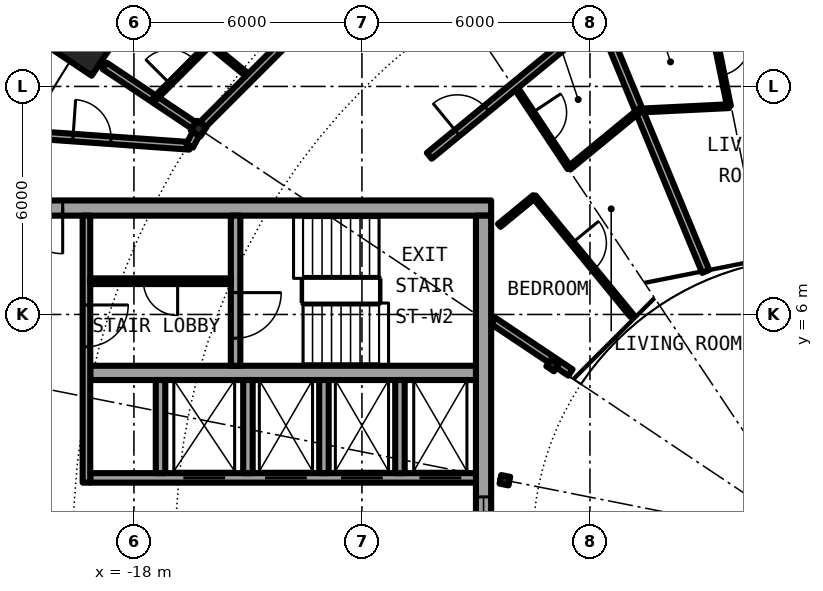
"""IFC4 building model, lengths in metres.
Left out: names, types, materials, properties, quantities, classifications, styles, units other than length and angle.
Written with IfcOpenShell. Run it as: python <this file> out.ifc"""

import sys

from ifc_helpers import new_model, si_unit, direction, frame, frame_2d, origin, origin_2d, place, context, subcontext, project, spatial, rectangle, hollow_circle, i_section, extrude, element, fill, save


model = new_model("IFC4")
c1 = context("Model", 3, precision=1e-05, world=origin(), true_north=direction((0.0, 1.0)))
c2 = subcontext(c1, "Body", "Model", "MODEL_VIEW")
j1 = project(units=[si_unit("LENGTHUNIT", "METRE"), si_unit("PLANEANGLEUNIT", "RADIAN")], contexts=[c1])
p1 = place(None, origin())
s1 = spatial("IfcSite", under=j1, at=p1, CompositionType="ELEMENT")
p2 = place(p1, origin())
s2 = spatial("IfcBuilding", under=s1, at=p2, CompositionType="ELEMENT")
p3 = place(p2, frame((0.0, 0.0, 246.25)))
s3 = spatial("IfcBuildingStorey", under=s2, at=p3, CompositionType="ELEMENT", Elevation=246.25)
p4 = place(p3, frame((-19.955, 13.334, 0.0), z_axis=(0.346819263352, -0.231767499499, 0.908845545043), x_axis=(0.555620411262, 0.831436082083, 0.0)))
e1 = element("IfcColumn", 1, at=p4, inside=s3, PredefinedType="COLUMN", context=c2, shape_type="SweptSolid", body=[
    extrude(hollow_circle(Radius=0.406, WallThickness=0.03, at=origin_2d()), origin(), (0.0, 0.0, 1.0), 3.081),
])
p5 = place(p3, frame((-16.297, 10.889, 0.0), z_axis=(0.0, 0.0, 1.0), x_axis=(-0.831469612303, 0.55557023302, 0.0)))
e2 = element("IfcColumn", 2, at=p5, inside=s3, PredefinedType="COLUMN", context=c2, shape_type="SweptSolid", body=[
    extrude(i_section(OverallWidth=0.3, OverallDepth=0.3, WebThickness=0.011, FlangeThickness=0.019, FilletRadius=0.027, at=origin_2d()), origin(), (0.0, 0.0, 1.0), 3.05),
])
for number, where, z_axis, x_axis in (
    (3, (-6.984, 4.667, 0.0), (0.0, 0.0, 1.0), (-0.831, 0.556, 0.0)),
    (4, (-8.239, 1.639, 0.0), (0.0, 0.0, 1.0), (-0.981, 0.195, 0.0)),
):
    element("IfcColumn", number, at=place(p3, frame(where, z_axis=z_axis, x_axis=x_axis)), inside=s3, PredefinedType="COLUMN", context=c2, shape_type="SweptSolid", body=[
        extrude(i_section(OverallWidth=0.24, OverallDepth=0.23, WebThickness=0.008, FlangeThickness=0.012, FilletRadius=0.021, at=origin_2d()), origin(), (0.0, 0.0, 1.0), 3.05),
    ])
p6 = place(p3, frame((-8.6, 8.8, 0.0), z_axis=(0.0, 0.0, 1.0), x_axis=(-1.0, 0.0, 0.0)))
e5 = element("IfcWall", 5, at=p6, inside=s3, PredefinedType="SHEAR", context=c2, shape_type="SweptSolid", body=[
    extrude(rectangle(XDim=13.4, YDim=0.4, at=frame_2d((6.7, 0.0))), origin(), (0.0, 0.0, 1.0), 3.05),
])
p7 = place(p6, frame((11.275, 0.0, 0.0)))
e6 = element("IfcOpeningElement", 6, at=p7, cuts=e5, PredefinedType="OPENING", context=c2, shape_type="SweptSolid", body=[
    extrude(rectangle(XDim=1.2, YDim=2.3, at=frame_2d((0.6, 1.15))), frame((0.0, 0.21, 0.0), z_axis=(0.0, -1.0, 0.0), x_axis=(1.0, 0.0, 0.0)), (0.0, 0.0, 1.0), 0.42),
])
p8 = place(p3, frame((-8.8, 8.6, 0.0), z_axis=(0.0, 0.0, 1.0), x_axis=(0.0, -1.0, 0.0)))
e7 = element("IfcWall", 7, at=p8, inside=s3, PredefinedType="SHEAR", context=c2, shape_type="SweptSolid", body=[
    extrude(rectangle(XDim=17.2, YDim=0.4, at=frame_2d((8.6, 0.0))), origin(), (0.0, 0.0, 1.0), 3.05),
])
p9 = place(p8, frame((7.4, 0.0, 0.1)))
e8 = element("IfcOpeningElement", 8, at=p9, cuts=e7, PredefinedType="OPENING", context=c2, shape_type="SweptSolid", body=[
    extrude(rectangle(XDim=2.4, YDim=2.2, at=frame_2d((1.2, 1.1))), frame((0.0, 0.21, 0.0), z_axis=(0.0, -1.0, 0.0), x_axis=(1.0, 0.0, 0.0)), (0.0, 0.0, 1.0), 0.42),
])
p10 = place(p3, frame((-9.0, 1.7, 0.0), z_axis=(0.0, 0.0, 1.0), x_axis=(-1.0, 0.0, 0.0)))
e9 = element("IfcWall", 9, at=p10, inside=s3, PredefinedType="SHEAR", context=c2, shape_type="SweptSolid", body=[
    extrude(rectangle(XDim=10.15, YDim=0.25, at=frame_2d((5.075, 0.0))), origin(), (0.0, 0.0, 1.0), 3.05),
])
p11 = place(p10, frame((0.387, 0.0, 0.0)))
e10 = element("IfcOpeningElement", 10, at=p11, cuts=e9, PredefinedType="OPENING", context=c2, shape_type="SweptSolid", body=[
    extrude(rectangle(XDim=1.1, YDim=2.3, at=frame_2d((0.55, 1.15))), frame((0.0, 0.135, 0.0), z_axis=(0.0, -1.0, 0.0), x_axis=(1.0, 0.0, 0.0)), (0.0, 0.0, 1.0), 0.27),
])
p12 = place(p10, frame((2.45, 0.0, 0.0)))
e11 = element("IfcOpeningElement", 11, at=p12, cuts=e9, PredefinedType="OPENING", context=c2, shape_type="SweptSolid", body=[
    extrude(rectangle(XDim=1.1, YDim=2.3, at=frame_2d((0.55, 1.15))), frame((0.0, 0.135, 0.0), z_axis=(0.0, -1.0, 0.0), x_axis=(1.0, 0.0, 0.0)), (0.0, 0.0, 1.0), 0.27),
])
p13 = place(p10, frame((4.45, 0.0, 0.0)))
e12 = element("IfcOpeningElement", 12, at=p13, cuts=e9, PredefinedType="OPENING", context=c2, shape_type="SweptSolid", body=[
    extrude(rectangle(XDim=1.1, YDim=2.3, at=frame_2d((0.55, 1.15))), frame((0.0, 0.135, 0.0), z_axis=(0.0, -1.0, 0.0), x_axis=(1.0, 0.0, 0.0)), (0.0, 0.0, 1.0), 0.27),
])
p14 = place(p10, frame((6.6, 0.0, 0.0)))
e13 = element("IfcOpeningElement", 13, at=p14, cuts=e9, PredefinedType="OPENING", context=c2, shape_type="SweptSolid", body=[
    extrude(rectangle(XDim=1.1, YDim=2.3, at=frame_2d((0.55, 1.15))), frame((0.0, 0.135, 0.0), z_axis=(0.0, -1.0, 0.0), x_axis=(1.0, 0.0, 0.0)), (0.0, 0.0, 1.0), 0.27),
])
p15 = place(p3, frame((-9.0, 4.462, 0.0), z_axis=(0.0, 0.0, 1.0), x_axis=(-1.0, 0.0, 0.0)))
e14 = element("IfcWall", 14, at=p15, inside=s3, PredefinedType="SHEAR", context=c2, shape_type="SweptSolid", body=[
    extrude(rectangle(XDim=10.15, YDim=0.375, at=frame_2d((5.075, 0.0))), origin(), (0.0, 0.0, 1.0), 3.05),
])
p16 = place(p3, frame((-15.325, 8.6, 0.0), z_axis=(0.0, 0.0, 1.0), x_axis=(0.0, -1.0, 0.0)))
e15 = element("IfcWall", 15, at=p16, inside=s3, PredefinedType="SHEAR", context=c2, shape_type="SweptSolid", body=[
    extrude(rectangle(XDim=3.95, YDim=0.25, at=frame_2d((1.975, 0.0))), origin(), (0.0, 0.0, 1.0), 3.05),
])
p17 = place(p16, frame((2.025, 0.0, 0.0)))
e16 = element("IfcOpeningElement", 16, at=p17, cuts=e15, PredefinedType="OPENING", context=c2, shape_type="SweptSolid", body=[
    extrude(rectangle(XDim=1.2, YDim=2.3, at=frame_2d((0.6, 1.15))), frame((0.0, 0.135, 0.0), z_axis=(0.0, -1.0, 0.0), x_axis=(1.0, 0.0, 0.0)), (0.0, 0.0, 1.0), 0.27),
])
for number, where, z_axis, x_axis in (
    (17, (-15.0, 1.825, 0.0), (0.0, 0.0, 1.0), (0.0, 1.0, 0.0)),
    (18, (-17.3, 1.825, 0.0), (0.0, 0.0, 1.0), (0.0, 1.0, 0.0)),
):
    element("IfcWall", number, at=place(p3, frame(where, z_axis=z_axis, x_axis=x_axis)), inside=s3, PredefinedType="SOLIDWALL", context=c2, shape_type="SweptSolid", body=[
        extrude(rectangle(XDim=2.45, YDim=0.25, at=frame_2d((1.225, 0.0))), origin(), (0.0, 0.0, 1.0), 2.7),
    ])
p18 = place(p3, frame((-19.25, 8.6, 0.0), z_axis=(0.0, 0.0, 1.0), x_axis=(0.0, -1.0, 0.0)))
e19 = element("IfcWall", 19, at=p18, inside=s3, PredefinedType="SOLIDWALL", context=c2, shape_type="SweptSolid", body=[
    extrude(rectangle(XDim=7.025, YDim=0.2, at=frame_2d((3.513, 0.0))), origin(), (0.0, 0.0, 1.0), 2.7),
])
p19 = place(p18, frame((2.35, 0.0, 0.0)))
e20 = element("IfcOpeningElement", 20, at=p19, cuts=e19, PredefinedType="OPENING", context=c2, shape_type="SweptSolid", body=[
    extrude(rectangle(XDim=1.1, YDim=2.3, at=frame_2d((0.55, 1.15))), frame((0.0, 0.11, 0.0), z_axis=(0.0, -1.0, 0.0), x_axis=(1.0, 0.0, 0.0)), (0.0, 0.0, 1.0), 0.22),
])
for number, where, z_axis, x_axis in (
    (21, (-11.0, 1.825, 0.0), (0.0, 0.0, 1.0), (0.0, 1.0, 0.0)),
    (22, (-13.0, 1.825, 0.0), (0.0, 0.0, 1.0), (0.0, 1.0, 0.0)),
):
    element("IfcWall", number, at=place(p3, frame(where, z_axis=z_axis, x_axis=x_axis)), inside=s3, PredefinedType="SOLIDWALL", context=c2, shape_type="SweptSolid", body=[
        extrude(rectangle(XDim=2.45, YDim=0.25, at=frame_2d((1.225, 0.0))), origin(), (0.0, 0.0, 1.0), 2.7),
    ])
p20 = place(p3, frame((-15.45, 6.875, 0.0), z_axis=(0.0, 0.0, 1.0), x_axis=(-1.0, 0.0, 0.0)))
e23 = element("IfcWall", 23, at=p20, inside=s3, PredefinedType="PARTITIONING", context=c2, shape_type="SweptSolid", body=[
    extrude(rectangle(XDim=3.7, YDim=0.15, at=frame_2d((1.85, 0.0))), origin(), (0.0, 0.0, 1.0), 2.7),
])
p21 = place(p20, frame((1.4, 0.0, 0.0)))
e24 = element("IfcOpeningElement", 24, at=p21, cuts=e23, PredefinedType="OPENING", context=c2, shape_type="SweptSolid", body=[
    extrude(rectangle(XDim=0.9, YDim=2.3, at=frame_2d((0.45, 1.15))), frame((0.0, 0.085, 0.0), z_axis=(0.0, -1.0, 0.0), x_axis=(1.0, 0.0, 0.0)), (0.0, 0.0, 1.0), 0.17),
])
p22 = place(p3, frame((-18.769, 12.541, 0.0), z_axis=(0.0, 0.0, 1.0), x_axis=(0.83131782921, -0.555797325324, 0.0)))
e25 = element("IfcWall", 25, at=p22, inside=s3, PredefinedType="PARTITIONING", context=c2, shape_type="SweptSolid", body=[
    extrude(rectangle(XDim=2.823, YDim=0.2, at=frame_2d((1.412, 0.0))), origin(), (0.0, 0.0, 1.0), 2.7),
])
p23 = place(p3, frame((-16.012, 13.115, 0.0), z_axis=(0.0, 0.0, 1.0), x_axis=(0.773562805085, -0.633719643525, 0.0)))
e26 = element("IfcWall", 26, at=p23, inside=s3, PredefinedType="PARTITIONING", context=c2, shape_type="SweptSolid", body=[
    extrude(rectangle(XDim=1.379, YDim=0.1, at=frame_2d((0.689, 0.0))), origin(), (0.0, 0.0, 1.0), 2.7),
])
p24 = place(p3, frame((-7.984, 12.017, 0.0), z_axis=(0.0, 0.0, 1.0), x_axis=(0.553289146762, -0.832989267683, 0.0)))
e27 = element("IfcWall", 27, at=p24, inside=s3, PredefinedType="PARTITIONING", context=c2, shape_type="SweptSolid", body=[
    extrude(rectangle(XDim=2.597, YDim=0.1, at=frame_2d((1.298, 0.0))), origin(), (0.0, 0.0, 1.0), 2.7),
])
p25 = place(p24, frame((0.848, 0.0, 0.0)))
e28 = element("IfcOpeningElement", 28, at=p25, cuts=e27, PredefinedType="OPENING", context=c2, shape_type="SweptSolid", body=[
    extrude(rectangle(XDim=0.9, YDim=2.3, at=frame_2d((0.45, 1.15))), frame((0.0, 0.06, 0.0), z_axis=(0.0, -1.0, 0.0), x_axis=(1.0, 0.0, 0.0)), (0.0, 0.0, 1.0), 0.12),
])
p26 = place(p3, frame((-7.467, 9.099, 0.0), z_axis=(0.0, 0.0, 1.0), x_axis=(0.634313840507, -0.773075644256, 0.0)))
e29 = element("IfcWall", 29, at=p26, inside=s3, PredefinedType="PARTITIONING", context=c2, shape_type="SweptSolid", body=[
    extrude(rectangle(XDim=4.05, YDim=0.1, at=frame_2d((2.025, 0.0))), origin(), (0.0, 0.0, 1.0), 2.7),
])
p27 = place(p26, frame((1.575, 0.0, 0.0)))
e30 = element("IfcOpeningElement", 30, at=p27, cuts=e29, PredefinedType="OPENING", context=c2, shape_type="SweptSolid", body=[
    extrude(rectangle(XDim=0.9, YDim=2.3, at=frame_2d((0.45, 1.15))), frame((0.0, 0.06, 0.0), z_axis=(0.0, -1.0, 0.0), x_axis=(1.0, 0.0, 0.0)), (0.0, 0.0, 1.0), 0.12),
])
p28 = place(p3, frame((-5.74, 13.858, 0.0), z_axis=(0.0, 0.0, 1.0), x_axis=(0.38267858248, -0.923881541385, 0.0)))
e31 = element("IfcWall", 31, at=p28, inside=s3, PredefinedType="PARTITIONING", context=c2, shape_type="SweptSolid", body=[
    extrude(rectangle(XDim=7.28, YDim=0.2, at=frame_2d((3.64, 0.0))), origin(), (0.0, 0.0, 1.0), 2.7),
])
p29 = place(p3, frame((-2.856, 14.0, 0.0), z_axis=(0.0, 0.0, 1.0), x_axis=(0.199820523641, -0.979832515449, 0.0)))
e32 = element("IfcWall", 32, at=p29, inside=s3, PredefinedType="PARTITIONING", context=c2, shape_type="SweptSolid", body=[
    extrude(rectangle(XDim=2.572, YDim=0.1, at=frame_2d((1.286, 0.0))), origin(), (0.0, 0.0, 1.0), 2.7),
])
p30 = place(p29, frame((0.836, 0.0, 0.0)))
e33 = element("IfcOpeningElement", 33, at=p30, cuts=e32, PredefinedType="OPENING", context=c2, shape_type="SweptSolid", body=[
    extrude(rectangle(XDim=0.9, YDim=2.3, at=frame_2d((0.45, 1.15))), frame((0.0, 0.06, 0.0), z_axis=(0.0, -1.0, 0.0), x_axis=(1.0, 0.0, 0.0)), (0.0, 0.0, 1.0), 0.12),
])
p31 = place(p3, frame((-6.513, 4.472, 0.0), z_axis=(0.0, 0.0, 1.0), x_axis=(-0.831450132577, 0.555599385382, 0.0)))
e34 = element("IfcWall", 34, at=p31, inside=s3, PredefinedType="PARTITIONING", context=c2, shape_type="SweptSolid", body=[
    extrude(rectangle(XDim=2.443, YDim=0.2, at=frame_2d((1.221, 0.0))), origin(), (0.0, 0.0, 1.0), 2.7),
])
p32 = place(p3, frame((-21.675, 10.8, 0.0), z_axis=(0.0, 0.0, 1.0), x_axis=(0.997515141784, -0.070452408845, 0.0)))
e35 = element("IfcWall", 35, at=p32, inside=s3, PredefinedType="PARTITIONING", context=c2, shape_type="SweptSolid", body=[
    extrude(rectangle(XDim=5.153, YDim=0.2, at=frame_2d((2.576, 0.0))), origin(), (0.0, 0.0, 1.0), 2.7),
])
p33 = place(p32, frame((2.076, 0.0, 0.0)))
e36 = element("IfcOpeningElement", 36, at=p33, cuts=e35, PredefinedType="OPENING", context=c2, shape_type="SweptSolid", body=[
    extrude(rectangle(XDim=1.0, YDim=2.3, at=frame_2d((0.5, 1.15))), frame((0.0, 0.11, 0.0), z_axis=(0.0, -1.0, 0.0), x_axis=(1.0, 0.0, 0.0)), (0.0, 0.0, 1.0), 0.22),
])
p34 = place(p3, frame((-4.707, 11.364, 0.0), z_axis=(0.0, 0.0, 1.0), x_axis=(0.998799958351, 0.048975945103, 0.0)))
e37 = element("IfcWall", 37, at=p34, inside=s3, PredefinedType="PARTITIONING", context=c2, shape_type="SweptSolid", body=[
    extrude(rectangle(XDim=2.368, YDim=0.1, at=frame_2d((1.184, 0.0))), origin(), (0.0, 0.0, 1.0), 2.7),
])
p35 = place(p3, frame((-8.387, 8.344, 0.0), z_axis=(0.0, 0.0, 1.0), x_axis=(0.772869802794, 0.634564628646, 0.0)))
e38 = element("IfcWall", 38, at=p35, inside=s3, PredefinedType="PARTITIONING", context=c2, shape_type="SweptSolid", body=[
    extrude(rectangle(XDim=1.192, YDim=0.1, at=frame_2d((0.596, 0.0))), origin(), (0.0, 0.0, 1.0), 2.7),
])
p36 = place(p3, frame((-6.547, 9.854, 0.0), z_axis=(0.0, 0.0, 1.0), x_axis=(0.773033390712, 0.634365333893, 0.0)))
e39 = element("IfcWall", 39, at=p36, inside=s3, PredefinedType="PARTITIONING", context=c2, shape_type="SweptSolid", body=[
    extrude(rectangle(XDim=2.38, YDim=0.1, at=frame_2d((1.19, 0.0))), origin(), (0.0, 0.0, 1.0), 2.7),
])
p37 = place(p3, frame((-10.228, 10.175, 0.0), z_axis=(0.0, 0.0, 1.0), x_axis=(0.772989261861, 0.634419105204, 0.0)))
e40 = element("IfcWall", 40, at=p37, inside=s3, PredefinedType="PARTITIONING", context=c2, shape_type="SweptSolid", body=[
    extrude(rectangle(XDim=5.803, YDim=0.2, at=frame_2d((2.902, 0.0))), origin(), (0.0, 0.0, 1.0), 2.7),
])
p38 = place(p37, frame((0.952, 0.0, 0.0)))
e41 = element("IfcOpeningElement", 41, at=p38, cuts=e40, PredefinedType="OPENING", context=c2, shape_type="SweptSolid", body=[
    extrude(rectangle(XDim=1.0, YDim=2.3, at=frame_2d((0.5, 1.15))), frame((0.0, 0.11, 0.0), z_axis=(0.0, -1.0, 0.0), x_axis=(1.0, 0.0, 0.0)), (0.0, 0.0, 1.0), 0.22),
])
p39 = place(p3, frame((-16.189, 10.997, 0.0), z_axis=(0.0, 0.0, 1.0), x_axis=(0.707106781187, 0.707106781187, 0.0)))
e42 = element("IfcWall", 42, at=p39, inside=s3, PredefinedType="PARTITIONING", context=c2, shape_type="SweptSolid", body=[
    extrude(rectangle(XDim=7.343, YDim=0.2, at=frame_2d((3.671, 0.0))), origin(), (0.0, 0.0, 1.0), 2.45),
])
p40 = place(p39, frame((4.127, 0.0, 0.0)))
e43 = element("IfcOpeningElement", 43, at=p40, cuts=e42, PredefinedType="OPENING", context=c2, shape_type="SweptSolid", body=[
    extrude(rectangle(XDim=1.0, YDim=2.3, at=frame_2d((0.5, 1.15))), frame((0.0, 0.11, 0.0), z_axis=(0.0, -1.0, 0.0), x_axis=(1.0, 0.0, 0.0)), (0.0, 0.0, 1.0), 0.22),
])
p41 = place(p3, frame((-16.535, 10.437, 0.0), z_axis=(0.0, 0.0, 1.0), x_axis=(0.465802239822, 0.884888848035, 0.0)))
e44 = element("IfcWall", 44, at=p41, inside=s3, PredefinedType="PARTITIONING", context=c2, shape_type="SweptSolid", body=[
    extrude(rectangle(XDim=0.361, YDim=0.2, at=frame_2d((0.18, 0.0))), origin(), (0.0, 0.0, 1.0), 2.7),
])
p42 = place(p3, frame((-17.461, 11.667, 0.0), z_axis=(0.0, 0.0, 1.0), x_axis=(0.707345104989, 0.706868377032, 0.0)))
e45 = element("IfcWall", 45, at=p42, inside=s3, PredefinedType="PARTITIONING", context=c2, shape_type="SweptSolid", body=[
    extrude(rectangle(XDim=2.049, YDim=0.1, at=frame_2d((1.024, 0.0))), origin(), (0.0, 0.0, 1.0), 2.7),
])
p43 = place(p42, frame((0.574, 0.0, 0.0)))
e46 = element("IfcOpeningElement", 46, at=p43, cuts=e45, PredefinedType="OPENING", context=c2, shape_type="SweptSolid", body=[
    extrude(rectangle(XDim=0.9, YDim=2.3, at=frame_2d((0.45, 1.15))), frame((0.0, 0.06, 0.0), z_axis=(0.0, -1.0, 0.0), x_axis=(1.0, 0.0, 0.0)), (0.0, 0.0, 1.0), 0.12),
])
p44 = place(p11, origin())
e47 = element("IfcDoor", 47, at=p44, inside=s3, OperationType="DOUBLE_DOOR_SLIDING", PredefinedType="DOOR", context=c2, shape_type="SweptSolid", body=[
    extrude(rectangle(XDim=1.1, YDim=2.3, at=frame_2d((0.55, 1.15))), frame((0.0, 0.025, 0.0), z_axis=(0.0, -1.0, 0.0), x_axis=(1.0, 0.0, 0.0)), (0.0, 0.0, 1.0), 0.05),
])
fill(e10, e47)
p45 = place(p12, origin())
e48 = element("IfcDoor", 48, at=p45, inside=s3, OperationType="DOUBLE_DOOR_SLIDING", PredefinedType="DOOR", context=c2, shape_type="SweptSolid", body=[
    extrude(rectangle(XDim=1.1, YDim=2.3, at=frame_2d((0.55, 1.15))), frame((0.0, 0.025, 0.0), z_axis=(0.0, -1.0, 0.0), x_axis=(1.0, 0.0, 0.0)), (0.0, 0.0, 1.0), 0.05),
])
fill(e11, e48)
p46 = place(p13, origin())
e49 = element("IfcDoor", 49, at=p46, inside=s3, OperationType="DOUBLE_DOOR_SLIDING", PredefinedType="DOOR", context=c2, shape_type="SweptSolid", body=[
    extrude(rectangle(XDim=1.1, YDim=2.3, at=frame_2d((0.55, 1.15))), frame((0.0, 0.025, 0.0), z_axis=(0.0, -1.0, 0.0), x_axis=(1.0, 0.0, 0.0)), (0.0, 0.0, 1.0), 0.05),
])
fill(e12, e49)
p47 = place(p14, origin())
e50 = element("IfcDoor", 50, at=p47, inside=s3, OperationType="DOUBLE_DOOR_SLIDING", PredefinedType="DOOR", context=c2, shape_type="SweptSolid", body=[
    extrude(rectangle(XDim=1.1, YDim=2.3, at=frame_2d((0.55, 1.15))), frame((0.0, 0.025, 0.0), z_axis=(0.0, -1.0, 0.0), x_axis=(1.0, 0.0, 0.0)), (0.0, 0.0, 1.0), 0.05),
])
fill(e13, e50)
p48 = place(p21, origin())
e51 = element("IfcDoor", 51, at=p48, inside=s3, OperationType="SINGLE_SWING_LEFT", PredefinedType="DOOR", context=c2, shape_type="SweptSolid", body=[
    extrude(rectangle(XDim=0.9, YDim=2.3, at=frame_2d((0.45, 1.15))), frame((0.0, 0.025, 0.0), z_axis=(0.0, -1.0, 0.0), x_axis=(1.0, 0.0, 0.0)), (0.0, 0.0, 1.0), 0.05),
])
fill(e24, e51)
p49 = place(p17, origin())
e52 = element("IfcDoor", 52, at=p49, inside=s3, OperationType="SINGLE_SWING_LEFT", PredefinedType="DOOR", context=c2, shape_type="SweptSolid", body=[
    extrude(rectangle(XDim=1.2, YDim=2.3, at=frame_2d((0.6, 1.15))), frame((0.0, 0.025, 0.0), z_axis=(0.0, -1.0, 0.0), x_axis=(1.0, 0.0, 0.0)), (0.0, 0.0, 1.0), 0.05),
])
fill(e16, e52)
p50 = place(p19, origin())
e53 = element("IfcDoor", 53, at=p50, inside=s3, OperationType="SINGLE_SWING_RIGHT", PredefinedType="DOOR", context=c2, shape_type="SweptSolid", body=[
    extrude(rectangle(XDim=1.1, YDim=2.3, at=frame_2d((0.55, 1.15))), frame((0.0, 0.025, 0.0), z_axis=(0.0, -1.0, 0.0), x_axis=(1.0, 0.0, 0.0)), (0.0, 0.0, 1.0), 0.05),
])
fill(e20, e53)
p51 = place(p7, origin())
e54 = element("IfcDoor", 54, at=p51, inside=s3, OperationType="SINGLE_SWING_LEFT", PredefinedType="DOOR", context=c2, shape_type="SweptSolid", body=[
    extrude(rectangle(XDim=1.2, YDim=2.3, at=frame_2d((0.6, 1.15))), frame((0.0, 0.025, 0.0), z_axis=(0.0, -1.0, 0.0), x_axis=(1.0, 0.0, 0.0)), (0.0, 0.0, 1.0), 0.05),
])
fill(e6, e54)
p52 = place(p9, origin())
e55 = element("IfcWindow", 55, at=p52, inside=s3, PartitioningType="SINGLE_PANEL", PredefinedType="WINDOW", context=c2, shape_type="SweptSolid", body=[
    extrude(rectangle(XDim=2.4, YDim=2.2, at=frame_2d((1.2, 1.1))), frame((0.0, 0.03, 0.0), z_axis=(0.0, -1.0, 0.0), x_axis=(1.0, 0.0, 0.0)), (0.0, 0.0, 1.0), 0.06),
])
fill(e8, e55)
p53 = place(p43, origin())
e56 = element("IfcDoor", 56, at=p53, inside=s3, OperationType="SINGLE_SWING_LEFT", PredefinedType="DOOR", context=c2, shape_type="SweptSolid", body=[
    extrude(rectangle(XDim=0.9, YDim=2.3, at=frame_2d((0.45, 1.15))), frame((0.0, 0.025, 0.0), z_axis=(0.0, -1.0, 0.0), x_axis=(1.0, 0.0, 0.0)), (0.0, 0.0, 1.0), 0.05),
])
fill(e46, e56)
p54 = place(p30, origin())
e57 = element("IfcDoor", 57, at=p54, inside=s3, OperationType="SINGLE_SWING_RIGHT", PredefinedType="DOOR", context=c2, shape_type="SweptSolid", body=[
    extrude(rectangle(XDim=0.9, YDim=2.3, at=frame_2d((0.45, 1.15))), frame((0.0, 0.025, 0.0), z_axis=(0.0, -1.0, 0.0), x_axis=(1.0, 0.0, 0.0)), (0.0, 0.0, 1.0), 0.05),
])
fill(e33, e57)
p55 = place(p38, origin())
e58 = element("IfcDoor", 58, at=p55, inside=s3, OperationType="SINGLE_SWING_LEFT", PredefinedType="DOOR", context=c2, shape_type="SweptSolid", body=[
    extrude(rectangle(XDim=1.0, YDim=2.3, at=frame_2d((0.5, 1.15))), frame((0.0, 0.025, 0.0), z_axis=(0.0, -1.0, 0.0), x_axis=(1.0, 0.0, 0.0)), (0.0, 0.0, 1.0), 0.05),
])
fill(e41, e58)
p56 = place(p25, origin())
e59 = element("IfcDoor", 59, at=p56, inside=s3, OperationType="SINGLE_SWING_RIGHT", PredefinedType="DOOR", context=c2, shape_type="SweptSolid", body=[
    extrude(rectangle(XDim=0.9, YDim=2.3, at=frame_2d((0.45, 1.15))), frame((0.0, 0.025, 0.0), z_axis=(0.0, -1.0, 0.0), x_axis=(1.0, 0.0, 0.0)), (0.0, 0.0, 1.0), 0.05),
])
fill(e28, e59)
p57 = place(p27, origin())
e60 = element("IfcDoor", 60, at=p57, inside=s3, OperationType="SINGLE_SWING_RIGHT", PredefinedType="DOOR", context=c2, shape_type="SweptSolid", body=[
    extrude(rectangle(XDim=0.9, YDim=2.3, at=frame_2d((0.45, 1.15))), frame((0.0, 0.025, 0.0), z_axis=(0.0, -1.0, 0.0), x_axis=(1.0, 0.0, 0.0)), (0.0, 0.0, 1.0), 0.05),
])
fill(e30, e60)
p58 = place(p33, origin())
e61 = element("IfcDoor", 61, at=p58, inside=s3, OperationType="SINGLE_SWING_RIGHT", PredefinedType="DOOR", context=c2, shape_type="SweptSolid", body=[
    extrude(rectangle(XDim=1.0, YDim=2.3, at=frame_2d((0.5, 1.15))), frame((0.0, 0.025, 0.0), z_axis=(0.0, -1.0, 0.0), x_axis=(1.0, 0.0, 0.0)), (0.0, 0.0, 1.0), 0.05),
])
fill(e36, e61)
save(model, sys.argv[1])
